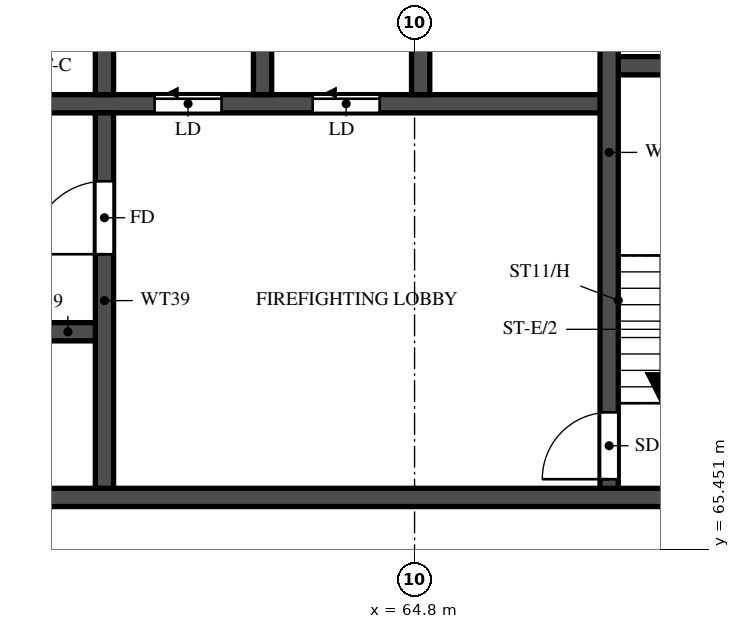
"""IFC4 building model, lengths in metres.
Left out: names, types, materials, properties, quantities, classifications, styles, units other than length and angle.
Written with IfcOpenShell. Run it as: python <this file> out.ifc"""

import sys

from ifc_helpers import new_model, si_unit, direction, frame, frame_2d, origin, place, context, subcontext, project, spatial, rectangle, extrude, element, fill, save


model = new_model("IFC4")
c1 = context("Model", 3, precision=1e-05, world=origin(), true_north=direction((0.0, 1.0)))
c2 = subcontext(c1, "Body", "Model", "MODEL_VIEW")
j1 = project(units=[si_unit("LENGTHUNIT", "METRE"), si_unit("PLANEANGLEUNIT", "RADIAN")], contexts=[c1])
p1 = place(None, origin())
s1 = spatial("IfcSite", under=j1, at=p1, CompositionType="ELEMENT")
p2 = place(p1, origin())
s2 = spatial("IfcBuilding", under=s1, at=p2, CompositionType="ELEMENT")
p3 = place(p2, frame((0.0, 0.0, 267.5)))
s3 = spatial("IfcBuildingStorey", under=s2, at=p3, CompositionType="ELEMENT", Elevation=267.5)
p4 = place(p3, frame((29.2, 66.3, 0.0), z_axis=(0.0, 0.0, 1.0), x_axis=(1.0, 0.0, 0.0)))
e1 = element("IfcWall", 1, at=p4, inside=s3, PredefinedType="SHEAR", context=c2, shape_type="SweptSolid", body=[
    extrude(rectangle(XDim=42.4, YDim=0.3, at=frame_2d((21.2, 0.0))), origin(), (0.0, 0.0, 1.0), 3.099),
])
p5 = place(p4, frame((1.425, 0.0, 0.0)))
e2 = element("IfcOpeningElement", 2, at=p5, cuts=e1, PredefinedType="OPENING", context=c2, shape_type="SweptSolid", body=[
    extrude(rectangle(XDim=1.1, YDim=2.1, at=frame_2d((0.55, 1.05))), frame((0.0, 0.16, 0.0), z_axis=(0.0, -1.0, 0.0), x_axis=(1.0, 0.0, 0.0)), (0.0, 0.0, 1.0), 0.32),
])
p6 = place(p4, frame((4.2, 0.0, 0.0)))
e3 = element("IfcOpeningElement", 3, at=p6, cuts=e1, PredefinedType="OPENING", context=c2, shape_type="SweptSolid", body=[
    extrude(rectangle(XDim=1.8, YDim=2.1, at=frame_2d((0.9, 1.05))), frame((0.0, 0.16, 0.0), z_axis=(0.0, -1.0, 0.0), x_axis=(1.0, 0.0, 0.0)), (0.0, 0.0, 1.0), 0.32),
])
p7 = place(p3, frame((35.65, 69.025, 0.0), z_axis=(0.0, 0.0, 1.0), x_axis=(1.0, 0.0, 0.0)))
e4 = element("IfcWall", 4, at=p7, inside=s3, PredefinedType="SHEAR", context=c2, shape_type="SweptSolid", body=[
    extrude(rectangle(XDim=24.05, YDim=0.3, at=frame_2d((12.025, 0.0))), origin(), (0.0, 0.0, 1.0), 3.099),
])
p8 = place(p7, frame((0.975, 0.0, 0.0)))
e5 = element("IfcOpeningElement", 5, at=p8, cuts=e4, PredefinedType="OPENING", context=c2, shape_type="SweptSolid", body=[
    extrude(rectangle(XDim=1.1, YDim=2.1, at=frame_2d((0.55, 1.05))), frame((0.0, 0.16, 0.0), z_axis=(0.0, -1.0, 0.0), x_axis=(1.0, 0.0, 0.0)), (0.0, 0.0, 1.0), 0.32),
])
p9 = place(p7, frame((3.725, 0.0, 0.0)))
e6 = element("IfcOpeningElement", 6, at=p9, cuts=e4, PredefinedType="OPENING", context=c2, shape_type="SweptSolid", body=[
    extrude(rectangle(XDim=1.1, YDim=2.1, at=frame_2d((0.55, 1.05))), frame((0.0, 0.16, 0.0), z_axis=(0.0, -1.0, 0.0), x_axis=(1.0, 0.0, 0.0)), (0.0, 0.0, 1.0), 0.32),
])
p10 = place(p7, frame((6.475, 0.0, 0.0)))
e7 = element("IfcOpeningElement", 7, at=p10, cuts=e4, PredefinedType="OPENING", context=c2, shape_type="SweptSolid", body=[
    extrude(rectangle(XDim=1.1, YDim=2.1, at=frame_2d((0.55, 1.05))), frame((0.0, 0.16, 0.0), z_axis=(0.0, -1.0, 0.0), x_axis=(1.0, 0.0, 0.0)), (0.0, 0.0, 1.0), 0.32),
])
p11 = place(p7, frame((9.225, 0.0, 0.0)))
e8 = element("IfcOpeningElement", 8, at=p11, cuts=e4, PredefinedType="OPENING", context=c2, shape_type="SweptSolid", body=[
    extrude(rectangle(XDim=1.1, YDim=2.1, at=frame_2d((0.55, 1.05))), frame((0.0, 0.16, 0.0), z_axis=(0.0, -1.0, 0.0), x_axis=(1.0, 0.0, 0.0)), (0.0, 0.0, 1.0), 0.32),
])
p12 = place(p7, frame((11.975, 0.0, 0.0)))
e9 = element("IfcOpeningElement", 9, at=p12, cuts=e4, PredefinedType="OPENING", context=c2, shape_type="SweptSolid", body=[
    extrude(rectangle(XDim=1.1, YDim=2.1, at=frame_2d((0.55, 1.05))), frame((0.0, 0.16, 0.0), z_axis=(0.0, -1.0, 0.0), x_axis=(1.0, 0.0, 0.0)), (0.0, 0.0, 1.0), 0.32),
])
p13 = place(p7, frame((14.725, 0.0, 0.0)))
e10 = element("IfcOpeningElement", 10, at=p13, cuts=e4, PredefinedType="OPENING", context=c2, shape_type="SweptSolid", body=[
    extrude(rectangle(XDim=1.1, YDim=2.1, at=frame_2d((0.55, 1.05))), frame((0.0, 0.16, 0.0), z_axis=(0.0, -1.0, 0.0), x_axis=(1.0, 0.0, 0.0)), (0.0, 0.0, 1.0), 0.32),
])
p14 = place(p7, frame((17.6, 0.0, 0.0)))
e11 = element("IfcOpeningElement", 11, at=p14, cuts=e4, PredefinedType="OPENING", context=c2, shape_type="SweptSolid", body=[
    extrude(rectangle(XDim=1.1, YDim=2.1, at=frame_2d((0.55, 1.05))), frame((0.0, 0.16, 0.0), z_axis=(0.0, -1.0, 0.0), x_axis=(1.0, 0.0, 0.0)), (0.0, 0.0, 1.0), 0.32),
])
p15 = place(p7, frame((20.6, 0.0, 0.0)))
e12 = element("IfcOpeningElement", 12, at=p15, cuts=e4, PredefinedType="OPENING", context=c2, shape_type="SweptSolid", body=[
    extrude(rectangle(XDim=1.1, YDim=2.1, at=frame_2d((0.55, 1.05))), frame((0.0, 0.16, 0.0), z_axis=(0.0, -1.0, 0.0), x_axis=(1.0, 0.0, 0.0)), (0.0, 0.0, 1.0), 0.32),
])
p16 = place(p3, frame((32.8, 72.775, 0.0), z_axis=(0.0, 0.0, 1.0), x_axis=(1.0, 0.0, 0.0)))
e13 = element("IfcWall", 13, at=p16, inside=s3, PredefinedType="SHEAR", context=c2, shape_type="SweptSolid", body=[
    extrude(rectangle(XDim=35.2, YDim=0.3, at=frame_2d((17.6, 0.0))), origin(), (0.0, 0.0, 1.0), 3.099),
])
p17 = place(p16, frame((19.8, 0.0, 0.0)))
e14 = element("IfcOpeningElement", 14, at=p17, cuts=e13, PredefinedType="OPENING", context=c2, shape_type="SweptSolid", body=[
    extrude(rectangle(XDim=1.1, YDim=2.1, at=frame_2d((0.55, 1.05))), frame((0.0, 0.16, 0.0), z_axis=(0.0, -1.0, 0.0), x_axis=(1.0, 0.0, 0.0)), (0.0, 0.0, 1.0), 0.32),
])
p18 = place(p16, frame((27.725, 0.0, 0.0)))
e15 = element("IfcOpeningElement", 15, at=p18, cuts=e13, PredefinedType="OPENING", context=c2, shape_type="SweptSolid", body=[
    extrude(rectangle(XDim=1.1, YDim=2.1, at=frame_2d((0.55, 1.05))), frame((0.0, 0.16, 0.0), z_axis=(0.0, -1.0, 0.0), x_axis=(1.0, 0.0, 0.0)), (0.0, 0.0, 1.0), 0.32),
])
p19 = place(p16, frame((30.325, 0.0, 0.0)))
e16 = element("IfcOpeningElement", 16, at=p19, cuts=e13, PredefinedType="OPENING", context=c2, shape_type="SweptSolid", body=[
    extrude(rectangle(XDim=1.1, YDim=2.1, at=frame_2d((0.55, 1.05))), frame((0.0, 0.16, 0.0), z_axis=(0.0, -1.0, 0.0), x_axis=(1.0, 0.0, 0.0)), (0.0, 0.0, 1.0), 0.32),
])
p20 = place(p16, frame((3.825, 0.0, 0.0)))
e17 = element("IfcOpeningElement", 17, at=p20, cuts=e13, PredefinedType="OPENING", context=c2, shape_type="SweptSolid", body=[
    extrude(rectangle(XDim=1.1, YDim=2.1, at=frame_2d((0.55, 1.05))), frame((0.0, 0.16, 0.0), z_axis=(0.0, -1.0, 0.0), x_axis=(1.0, 0.0, 0.0)), (0.0, 0.0, 1.0), 0.32),
])
p21 = place(p16, frame((6.575, 0.0, 0.0)))
e18 = element("IfcOpeningElement", 18, at=p21, cuts=e13, PredefinedType="OPENING", context=c2, shape_type="SweptSolid", body=[
    extrude(rectangle(XDim=1.1, YDim=2.1, at=frame_2d((0.55, 1.05))), frame((0.0, 0.16, 0.0), z_axis=(0.0, -1.0, 0.0), x_axis=(1.0, 0.0, 0.0)), (0.0, 0.0, 1.0), 0.32),
])
p22 = place(p16, frame((9.325, 0.0, 0.0)))
e19 = element("IfcOpeningElement", 19, at=p22, cuts=e13, PredefinedType="OPENING", context=c2, shape_type="SweptSolid", body=[
    extrude(rectangle(XDim=1.1, YDim=2.1, at=frame_2d((0.55, 1.05))), frame((0.0, 0.16, 0.0), z_axis=(0.0, -1.0, 0.0), x_axis=(1.0, 0.0, 0.0)), (0.0, 0.0, 1.0), 0.32),
])
p23 = place(p16, frame((12.075, 0.0, 0.0)))
e20 = element("IfcOpeningElement", 20, at=p23, cuts=e13, PredefinedType="OPENING", context=c2, shape_type="SweptSolid", body=[
    extrude(rectangle(XDim=1.1, YDim=2.1, at=frame_2d((0.55, 1.05))), frame((0.0, 0.16, 0.0), z_axis=(0.0, -1.0, 0.0), x_axis=(1.0, 0.0, 0.0)), (0.0, 0.0, 1.0), 0.32),
])
p24 = place(p16, frame((14.825, 0.0, 0.0)))
e21 = element("IfcOpeningElement", 21, at=p24, cuts=e13, PredefinedType="OPENING", context=c2, shape_type="SweptSolid", body=[
    extrude(rectangle(XDim=1.1, YDim=2.1, at=frame_2d((0.55, 1.05))), frame((0.0, 0.16, 0.0), z_axis=(0.0, -1.0, 0.0), x_axis=(1.0, 0.0, 0.0)), (0.0, 0.0, 1.0), 0.32),
])
p25 = place(p16, frame((17.575, 0.0, 0.0)))
e22 = element("IfcOpeningElement", 22, at=p25, cuts=e13, PredefinedType="OPENING", context=c2, shape_type="SweptSolid", body=[
    extrude(rectangle(XDim=1.1, YDim=2.1, at=frame_2d((0.55, 1.05))), frame((0.0, 0.16, 0.0), z_axis=(0.0, -1.0, 0.0), x_axis=(1.0, 0.0, 0.0)), (0.0, 0.0, 1.0), 0.32),
])
p26 = place(p16, frame((0.95, 0.0, 0.0)))
e23 = element("IfcOpeningElement", 23, at=p26, cuts=e13, PredefinedType="OPENING", context=c2, shape_type="SweptSolid", body=[
    extrude(rectangle(XDim=1.1, YDim=2.1, at=frame_2d((0.55, 1.05))), frame((0.0, 0.16, 0.0), z_axis=(0.0, -1.0, 0.0), x_axis=(1.0, 0.0, 0.0)), (0.0, 0.0, 1.0), 0.32),
])
p27 = place(p3, frame((68.0, 73.4, 0.0), z_axis=(0.0, 0.0, 1.0), x_axis=(1.0, 0.0, 0.0)))
e24 = element("IfcWall", 24, at=p27, inside=s3, PredefinedType="SHEAR", context=c2, shape_type="SweptSolid", body=[
    extrude(rectangle(XDim=3.1, YDim=0.3, at=frame_2d((1.55, 0.0))), origin(), (0.0, 0.0, 1.0), 3.099),
])
p28 = place(p3, frame((68.0, 66.45, 0.0), z_axis=(0.0, 0.0, 1.0), x_axis=(0.0, 1.0, 0.0)))
e25 = element("IfcWall", 25, at=p28, inside=s3, PredefinedType="SHEAR", context=c2, shape_type="SweptSolid", body=[
    extrude(rectangle(XDim=11.05, YDim=0.3, at=frame_2d((5.525, 0.0))), origin(), (0.0, 0.0, 1.0), 3.099),
])
p29 = place(p28, frame((0.15, 0.0, 0.0)))
e26 = element("IfcOpeningElement", 26, at=p29, cuts=e25, PredefinedType="OPENING", context=c2, shape_type="SweptSolid", body=[
    extrude(rectangle(XDim=1.1, YDim=2.1, at=frame_2d((0.55, 1.05))), frame((0.0, 0.16, 0.0), z_axis=(0.0, -1.0, 0.0), x_axis=(1.0, 0.0, 0.0)), (0.0, 0.0, 1.0), 0.32),
])
p30 = place(p3, frame((59.7, 66.45, 0.0), z_axis=(0.0, 0.0, 1.0), x_axis=(0.0, 1.0, 0.0)))
e27 = element("IfcWall", 27, at=p30, inside=s3, PredefinedType="SHEAR", context=c2, shape_type="SweptSolid", body=[
    extrude(rectangle(XDim=6.175, YDim=0.3, at=frame_2d((3.087, 0.0))), origin(), (0.0, 0.0, 1.0), 3.099),
])
p31 = place(p30, frame((3.85, 0.0, 0.0)))
e28 = element("IfcOpeningElement", 28, at=p31, cuts=e27, PredefinedType="OPENING", context=c2, shape_type="SweptSolid", body=[
    extrude(rectangle(XDim=1.2, YDim=2.1, at=frame_2d((0.6, 1.05))), frame((0.0, 0.16, 0.0), z_axis=(0.0, -1.0, 0.0), x_axis=(1.0, 0.0, 0.0)), (0.0, 0.0, 1.0), 0.32),
])
for number, where, z_axis, x_axis in (
    (29, (59.7, 72.925, 0.0), (0.0, 0.0, 1.0), (0.0, 1.0, 0.0)),
    (30, (62.3, 72.925, 0.0), (0.0, 0.0, 1.0), (0.0, 1.0, 0.0)),
    (31, (64.9, 72.925, 0.0), (0.0, 0.0, 1.0), (0.0, 1.0, 0.0)),
):
    element("IfcWall", number, at=place(p3, frame(where, z_axis=z_axis, x_axis=x_axis)), inside=s3, PredefinedType="SHEAR", context=c2, shape_type="SweptSolid", body=[
        extrude(rectangle(XDim=2.95, YDim=0.3, at=frame_2d((1.475, 0.0))), origin(), (0.0, 0.0, 1.0), 3.099),
    ])
p32 = place(p29, origin())
e32 = element("IfcDoor", 32, at=p32, inside=s3, OperationType="SINGLE_SWING_RIGHT", PredefinedType="DOOR", context=c2, shape_type="SweptSolid", body=[
    extrude(rectangle(XDim=1.1, YDim=2.1, at=frame_2d((0.55, 1.05))), frame((0.0, 0.025, 0.0), z_axis=(0.0, -1.0, 0.0), x_axis=(1.0, 0.0, 0.0)), (0.0, 0.0, 1.0), 0.05),
])
fill(e26, e32)
p33 = place(p31, origin())
e33 = element("IfcDoor", 33, at=p33, inside=s3, OperationType="SINGLE_SWING_LEFT", PredefinedType="DOOR", context=c2, shape_type="SweptSolid", body=[
    extrude(rectangle(XDim=1.2, YDim=2.1, at=frame_2d((0.6, 1.05))), frame((0.0, 0.025, 0.0), z_axis=(0.0, -1.0, 0.0), x_axis=(1.0, 0.0, 0.0)), (0.0, 0.0, 1.0), 0.05),
])
fill(e28, e33)
p34 = place(p18, origin())
e34 = element("IfcDoor", 34, at=p34, inside=s3, OperationType="SLIDING_TO_LEFT", PredefinedType="DOOR", context=c2, shape_type="SweptSolid", body=[
    extrude(rectangle(XDim=1.1, YDim=2.1, at=frame_2d((0.55, 1.05))), frame((0.0, 0.025, 0.0), z_axis=(0.0, -1.0, 0.0), x_axis=(1.0, 0.0, 0.0)), (0.0, 0.0, 1.0), 0.05),
])
fill(e15, e34)
p35 = place(p19, origin())
e35 = element("IfcDoor", 35, at=p35, inside=s3, OperationType="SLIDING_TO_LEFT", PredefinedType="DOOR", context=c2, shape_type="SweptSolid", body=[
    extrude(rectangle(XDim=1.1, YDim=2.1, at=frame_2d((0.55, 1.05))), frame((0.0, 0.025, 0.0), z_axis=(0.0, -1.0, 0.0), x_axis=(1.0, 0.0, 0.0)), (0.0, 0.0, 1.0), 0.05),
])
fill(e16, e35)
save(model, sys.argv[1])
